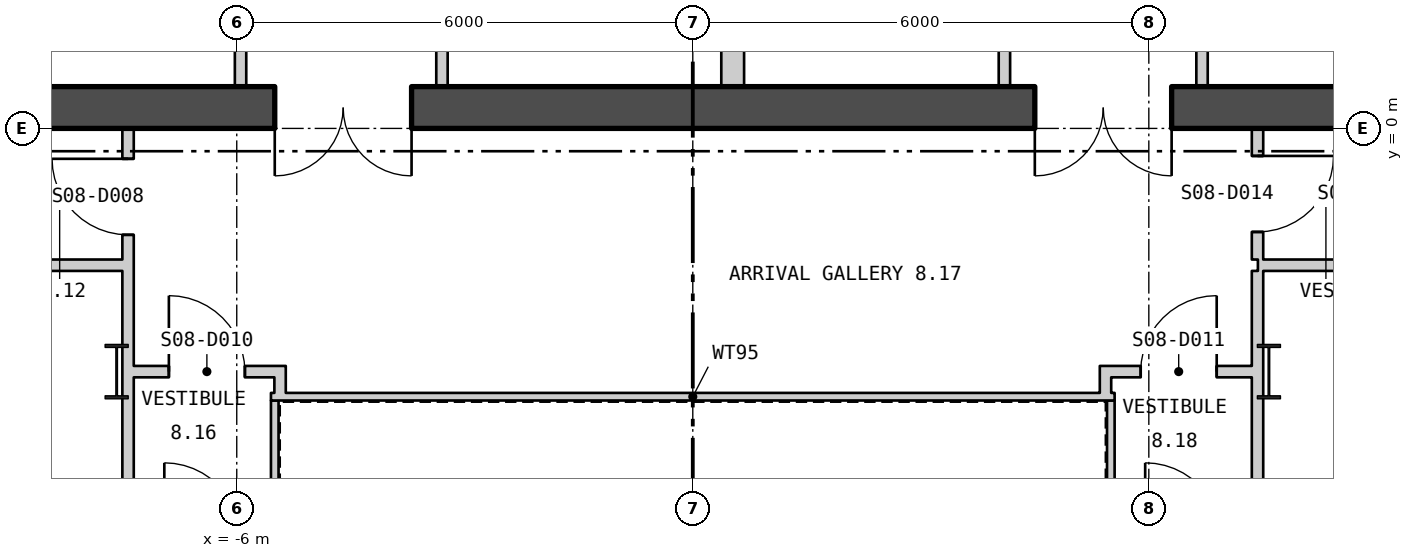
"""IFC4 building model, lengths in metres.
Left out: names, types, materials, properties, quantities, classifications, styles, units other than length and angle.
Written with IfcOpenShell. Run it as: python <this file> out.ifc"""

import sys

from ifc_helpers import new_model, si_unit, direction, frame, frame_2d, origin, origin_2d, place, context, subcontext, project, spatial, polyline, rectangle, i_section, outline, extrude, element, fill, save


model = new_model("IFC4")
c1 = context("Model", 3, precision=1e-05, world=origin(), true_north=direction((0.0, 1.0)))
c2 = subcontext(c1, "Body", "Model", "MODEL_VIEW")
j1 = project(units=[si_unit("LENGTHUNIT", "METRE"), si_unit("PLANEANGLEUNIT", "RADIAN")], contexts=[c1])
p1 = place(None, origin())
s1 = spatial("IfcSite", under=j1, at=p1, CompositionType="ELEMENT")
p2 = place(p1, origin())
s2 = spatial("IfcBuilding", under=s1, at=p2, CompositionType="ELEMENT")
p3 = place(p2, frame((0.0, 0.0, 111.3)))
s3 = spatial("IfcBuildingStorey", under=s2, at=p3, CompositionType="ELEMENT", Elevation=111.3)
for number, where, z_axis, x_axis in (
    (1, (7.58, -3.2, 0.0), (0.0, 0.0, 1.0), (1.0, 0.0, 0.0)),
    (2, (-7.58, -3.2, 0.0), (0.0, 0.0, 1.0), (1.0, 0.0, 0.0)),
):
    element("IfcColumn", number, at=place(p3, frame(where, z_axis=z_axis, x_axis=x_axis)), inside=s3, PredefinedType="COLUMN", context=c2, shape_type="SweptSolid", body=[
        extrude(i_section(OverallWidth=0.304, OverallDepth=0.716, WebThickness=0.021, FlangeThickness=0.04, at=origin_2d()), origin(), (0.0, 0.0, 1.0), 4.5),
    ])
p4 = place(p3, frame((-27.595, 11.782, -0.18), z_axis=(0.0, 0.0, 1.0), x_axis=(0.500000141277, -0.866025322218, 0.0)))
e3 = element("IfcWall", 3, at=p4, inside=s3, PredefinedType="SOLIDWALL", context=c2, shape_type="SweptSolid", body=[
    extrude(outline(polyline([(-0.13, -0.225), (45.86, -0.225), (45.6, 0.225), (0.13, 0.225), (-0.13, -0.225)])), origin(), (0.0, 0.0, 1.0), 4.28),
])
p5 = place(p4, frame((1.424, 0.0, 1.08)))
e4 = element("IfcOpeningElement", 4, at=p5, cuts=e3, PredefinedType="OPENING", context=c2, shape_type="SweptSolid", body=[
    extrude(rectangle(XDim=2.4, YDim=2.6, at=frame_2d((1.2, 1.3))), frame((0.0, 0.235, 0.0), z_axis=(0.0, -1.0, 0.0), x_axis=(1.0, 0.0, 0.0)), (0.0, 0.0, 1.0), 0.47),
])
p6 = place(p4, frame((5.892, 0.0, 1.08)))
e5 = element("IfcOpeningElement", 5, at=p6, cuts=e3, PredefinedType="OPENING", context=c2, shape_type="SweptSolid", body=[
    extrude(rectangle(XDim=2.4, YDim=2.6, at=frame_2d((1.2, 1.3))), frame((0.0, 0.235, 0.0), z_axis=(0.0, -1.0, 0.0), x_axis=(1.0, 0.0, 0.0)), (0.0, 0.0, 1.0), 0.47),
])
p7 = place(p4, frame((10.399, 0.0, 1.08)))
e6 = element("IfcOpeningElement", 6, at=p7, cuts=e3, PredefinedType="OPENING", context=c2, shape_type="SweptSolid", body=[
    extrude(rectangle(XDim=2.4, YDim=2.6, at=frame_2d((1.2, 1.3))), frame((0.0, 0.235, 0.0), z_axis=(0.0, -1.0, 0.0), x_axis=(1.0, 0.0, 0.0)), (0.0, 0.0, 1.0), 0.47),
])
p8 = place(p4, frame((14.905, 0.0, 1.08)))
e7 = element("IfcOpeningElement", 7, at=p8, cuts=e3, PredefinedType="OPENING", context=c2, shape_type="SweptSolid", body=[
    extrude(rectangle(XDim=2.4, YDim=2.6, at=frame_2d((1.2, 1.3))), frame((0.0, 0.235, 0.0), z_axis=(0.0, -1.0, 0.0), x_axis=(1.0, 0.0, 0.0)), (0.0, 0.0, 1.0), 0.47),
])
p9 = place(p4, frame((19.412, 0.0, 1.08)))
e8 = element("IfcOpeningElement", 8, at=p9, cuts=e3, PredefinedType="OPENING", context=c2, shape_type="SweptSolid", body=[
    extrude(rectangle(XDim=2.4, YDim=2.6, at=frame_2d((1.2, 1.3))), frame((0.0, 0.235, 0.0), z_axis=(0.0, -1.0, 0.0), x_axis=(1.0, 0.0, 0.0)), (0.0, 0.0, 1.0), 0.47),
])
p10 = place(p4, frame((23.918, 0.0, 1.08)))
e9 = element("IfcOpeningElement", 9, at=p10, cuts=e3, PredefinedType="OPENING", context=c2, shape_type="SweptSolid", body=[
    extrude(rectangle(XDim=2.4, YDim=2.6, at=frame_2d((1.2, 1.3))), frame((0.0, 0.235, 0.0), z_axis=(0.0, -1.0, 0.0), x_axis=(1.0, 0.0, 0.0)), (0.0, 0.0, 1.0), 0.47),
])
p11 = place(p4, frame((28.425, 0.0, 1.08)))
e10 = element("IfcOpeningElement", 10, at=p11, cuts=e3, PredefinedType="OPENING", context=c2, shape_type="SweptSolid", body=[
    extrude(rectangle(XDim=2.4, YDim=2.6, at=frame_2d((1.2, 1.3))), frame((0.0, 0.235, 0.0), z_axis=(0.0, -1.0, 0.0), x_axis=(1.0, 0.0, 0.0)), (0.0, 0.0, 1.0), 0.47),
])
p12 = place(p4, frame((32.932, 0.0, 1.08)))
e11 = element("IfcOpeningElement", 11, at=p12, cuts=e3, PredefinedType="OPENING", context=c2, shape_type="SweptSolid", body=[
    extrude(rectangle(XDim=2.4, YDim=2.6, at=frame_2d((1.2, 1.3))), frame((0.0, 0.235, 0.0), z_axis=(0.0, -1.0, 0.0), x_axis=(1.0, 0.0, 0.0)), (0.0, 0.0, 1.0), 0.47),
])
p13 = place(p4, frame((37.438, 0.0, 1.08)))
e12 = element("IfcOpeningElement", 12, at=p13, cuts=e3, PredefinedType="OPENING", context=c2, shape_type="SweptSolid", body=[
    extrude(rectangle(XDim=2.4, YDim=2.6, at=frame_2d((1.2, 1.3))), frame((0.0, 0.235, 0.0), z_axis=(0.0, -1.0, 0.0), x_axis=(1.0, 0.0, 0.0)), (0.0, 0.0, 1.0), 0.47),
])
p14 = place(p4, frame((41.907, 0.0, 1.08)))
e13 = element("IfcOpeningElement", 13, at=p14, cuts=e3, PredefinedType="OPENING", context=c2, shape_type="SweptSolid", body=[
    extrude(rectangle(XDim=2.4, YDim=2.6, at=frame_2d((1.2, 1.3))), frame((0.0, 0.235, 0.0), z_axis=(0.0, -1.0, 0.0), x_axis=(1.0, 0.0, 0.0)), (0.0, 0.0, 1.0), 0.47),
])
p15 = place(p3, frame((4.73, -27.821, -0.18), z_axis=(0.0, 0.0, 1.0), x_axis=(0.500000141277, 0.866025322218, 0.0)))
e14 = element("IfcWall", 14, at=p15, inside=s3, PredefinedType="SOLIDWALL", context=c2, shape_type="SweptSolid", body=[
    extrude(outline(polyline([(-0.13, -0.225), (45.86, -0.225), (45.6, 0.225), (0.13, 0.225), (-0.13, -0.225)])), origin(), (0.0, 0.0, 1.0), 4.28),
])
p16 = place(p15, frame((1.424, 0.0, 1.08)))
e15 = element("IfcOpeningElement", 15, at=p16, cuts=e14, PredefinedType="OPENING", context=c2, shape_type="SweptSolid", body=[
    extrude(rectangle(XDim=2.4, YDim=2.6, at=frame_2d((1.2, 1.3))), frame((0.0, 0.235, 0.0), z_axis=(0.0, -1.0, 0.0), x_axis=(1.0, 0.0, 0.0)), (0.0, 0.0, 1.0), 0.47),
])
p17 = place(p15, frame((5.892, 0.0, 1.08)))
e16 = element("IfcOpeningElement", 16, at=p17, cuts=e14, PredefinedType="OPENING", context=c2, shape_type="SweptSolid", body=[
    extrude(rectangle(XDim=2.4, YDim=2.6, at=frame_2d((1.2, 1.3))), frame((0.0, 0.235, 0.0), z_axis=(0.0, -1.0, 0.0), x_axis=(1.0, 0.0, 0.0)), (0.0, 0.0, 1.0), 0.47),
])
p18 = place(p15, frame((10.399, 0.0, 1.08)))
e17 = element("IfcOpeningElement", 17, at=p18, cuts=e14, PredefinedType="OPENING", context=c2, shape_type="SweptSolid", body=[
    extrude(rectangle(XDim=2.4, YDim=2.6, at=frame_2d((1.2, 1.3))), frame((0.0, 0.235, 0.0), z_axis=(0.0, -1.0, 0.0), x_axis=(1.0, 0.0, 0.0)), (0.0, 0.0, 1.0), 0.47),
])
p19 = place(p15, frame((14.905, 0.0, 1.08)))
e18 = element("IfcOpeningElement", 18, at=p19, cuts=e14, PredefinedType="OPENING", context=c2, shape_type="SweptSolid", body=[
    extrude(rectangle(XDim=2.4, YDim=2.6, at=frame_2d((1.2, 1.3))), frame((0.0, 0.235, 0.0), z_axis=(0.0, -1.0, 0.0), x_axis=(1.0, 0.0, 0.0)), (0.0, 0.0, 1.0), 0.47),
])
p20 = place(p15, frame((19.412, 0.0, 1.08)))
e19 = element("IfcOpeningElement", 19, at=p20, cuts=e14, PredefinedType="OPENING", context=c2, shape_type="SweptSolid", body=[
    extrude(rectangle(XDim=2.4, YDim=2.6, at=frame_2d((1.2, 1.3))), frame((0.0, 0.235, 0.0), z_axis=(0.0, -1.0, 0.0), x_axis=(1.0, 0.0, 0.0)), (0.0, 0.0, 1.0), 0.47),
])
p21 = place(p15, frame((23.918, 0.0, 1.08)))
e20 = element("IfcOpeningElement", 20, at=p21, cuts=e14, PredefinedType="OPENING", context=c2, shape_type="SweptSolid", body=[
    extrude(rectangle(XDim=2.4, YDim=2.6, at=frame_2d((1.2, 1.3))), frame((0.0, 0.235, 0.0), z_axis=(0.0, -1.0, 0.0), x_axis=(1.0, 0.0, 0.0)), (0.0, 0.0, 1.0), 0.47),
])
p22 = place(p15, frame((28.425, 0.0, 1.08)))
e21 = element("IfcOpeningElement", 21, at=p22, cuts=e14, PredefinedType="OPENING", context=c2, shape_type="SweptSolid", body=[
    extrude(rectangle(XDim=2.4, YDim=2.6, at=frame_2d((1.2, 1.3))), frame((0.0, 0.235, 0.0), z_axis=(0.0, -1.0, 0.0), x_axis=(1.0, 0.0, 0.0)), (0.0, 0.0, 1.0), 0.47),
])
p23 = place(p15, frame((32.932, 0.0, 1.08)))
e22 = element("IfcOpeningElement", 22, at=p23, cuts=e14, PredefinedType="OPENING", context=c2, shape_type="SweptSolid", body=[
    extrude(rectangle(XDim=2.4, YDim=2.6, at=frame_2d((1.2, 1.3))), frame((0.0, 0.235, 0.0), z_axis=(0.0, -1.0, 0.0), x_axis=(1.0, 0.0, 0.0)), (0.0, 0.0, 1.0), 0.47),
])
p24 = place(p15, frame((37.438, 0.0, 1.08)))
e23 = element("IfcOpeningElement", 23, at=p24, cuts=e14, PredefinedType="OPENING", context=c2, shape_type="SweptSolid", body=[
    extrude(rectangle(XDim=2.4, YDim=2.6, at=frame_2d((1.2, 1.3))), frame((0.0, 0.235, 0.0), z_axis=(0.0, -1.0, 0.0), x_axis=(1.0, 0.0, 0.0)), (0.0, 0.0, 1.0), 0.47),
])
p25 = place(p15, frame((41.907, 0.0, 1.08)))
e24 = element("IfcOpeningElement", 24, at=p25, cuts=e14, PredefinedType="OPENING", context=c2, shape_type="SweptSolid", body=[
    extrude(rectangle(XDim=2.4, YDim=2.6, at=frame_2d((1.2, 1.3))), frame((0.0, 0.235, 0.0), z_axis=(0.0, -1.0, 0.0), x_axis=(1.0, 0.0, 0.0)), (0.0, 0.0, 1.0), 0.47),
])
p26 = place(p3, frame((5.5, -11.62, 0.0), z_axis=(0.0, 0.0, 1.0), x_axis=(0.0, 1.0, 0.0)))
e25 = element("IfcWall", 25, at=p26, inside=s3, PredefinedType="PARTITIONING", context=c2, shape_type="SweptSolid", body=[
    extrude(rectangle(XDim=8.04, YDim=0.1, at=frame_2d((4.02, 0.0))), origin(), (0.0, 0.0, 1.0), 4.3),
])
p27 = place(p3, frame((5.55, -3.53, 0.0), z_axis=(0.0, 0.0, 1.0), x_axis=(-1.0, 0.0, 0.0)))
e26 = element("IfcWall", 26, at=p27, inside=s3, PredefinedType="PARTITIONING", context=c2, shape_type="SweptSolid", body=[
    extrude(rectangle(XDim=11.1, YDim=0.1, at=frame_2d((5.55, 0.0))), origin(), (0.0, 0.0, 1.0), 4.3),
])
p28 = place(p3, frame((-5.5, -3.58, 0.0), z_axis=(0.0, 0.0, 1.0), x_axis=(0.0, -1.0, 0.0)))
e27 = element("IfcWall", 27, at=p28, inside=s3, PredefinedType="PARTITIONING", context=c2, shape_type="SweptSolid", body=[
    extrude(rectangle(XDim=8.04, YDim=0.1, at=frame_2d((4.02, 0.0))), origin(), (0.0, 0.0, 1.0), 4.3),
])
p29 = place(p3, frame((-17.5, 0.275, 0.0), z_axis=(0.0, 0.0, 1.0), x_axis=(1.0, 0.0, 0.0)))
e28 = element("IfcWall", 28, at=p29, inside=s3, PredefinedType="SHEAR", context=c2, shape_type="SweptSolid", body=[
    extrude(rectangle(XDim=35.0, YDim=0.55, at=frame_2d((17.5, 0.0))), origin(), (0.0, 0.0, 1.0), 4.3),
])
p30 = place(p29, frame((12.0, 0.0, 0.0)))
e29 = element("IfcOpeningElement", 29, at=p30, cuts=e28, PredefinedType="OPENING", context=c2, shape_type="SweptSolid", body=[
    extrude(rectangle(XDim=1.8, YDim=2.4, at=frame_2d((0.9, 1.2))), frame((0.0, 0.285, 0.0), z_axis=(0.0, -1.0, 0.0), x_axis=(1.0, 0.0, 0.0)), (0.0, 0.0, 1.0), 0.57),
])
p31 = place(p29, frame((22.0, 0.0, 0.0)))
e30 = element("IfcOpeningElement", 30, at=p31, cuts=e28, PredefinedType="OPENING", context=c2, shape_type="SweptSolid", body=[
    extrude(rectangle(XDim=1.8, YDim=2.4, at=frame_2d((0.9, 1.2))), frame((0.0, 0.285, 0.0), z_axis=(0.0, -1.0, 0.0), x_axis=(1.0, 0.0, 0.0)), (0.0, 0.0, 1.0), 0.57),
])
p32 = place(p3, frame((-5.95, 0.55, 0.0), z_axis=(0.0, 0.0, 1.0), x_axis=(0.0, 1.0, 0.0)))
e31 = element("IfcWall", 31, at=p32, inside=s3, PredefinedType="PARTITIONING", context=c2, shape_type="SweptSolid", body=[
    extrude(rectangle(XDim=2.875, YDim=0.15, at=frame_2d((1.438, 0.0))), origin(), (0.0, 0.0, 1.0), 4.3),
])
for number, where, z_axis, x_axis in (
    (32, (-3.3, 0.55, 0.0), (0.0, 0.0, 1.0), (0.0, 1.0, 0.0)),
    (33, (0.45, 0.55, 0.0), (0.0, 0.0, 1.0), (0.0, 1.0, 0.0)),
):
    element("IfcWall", number, at=place(p3, frame(where, z_axis=z_axis, x_axis=x_axis)), inside=s3, PredefinedType="PARTITIONING", context=c2, shape_type="SweptSolid", body=[
        extrude(rectangle(XDim=3.275, YDim=0.15, at=frame_2d((1.637, 0.0))), origin(), (0.0, 0.0, 1.0), 4.3),
    ])
for number, where, z_axis, x_axis in (
    (34, (0.6, 0.55, 0.0), (0.0, 0.0, 1.0), (0.0, 1.0, 0.0)),
    (35, (4.1, 0.55, 0.0), (0.0, 0.0, 1.0), (0.0, 1.0, 0.0)),
):
    element("IfcWall", number, at=place(p3, frame(where, z_axis=z_axis, x_axis=x_axis)), inside=s3, PredefinedType="PARTITIONING", context=c2, shape_type="SweptSolid", body=[
        extrude(rectangle(XDim=3.075, YDim=0.15, at=frame_2d((1.538, 0.0))), origin(), (0.0, 0.0, 1.0), 4.3),
    ])
p33 = place(p3, frame((6.7, 0.55, 0.0), z_axis=(0.0, 0.0, 1.0), x_axis=(0.0, 1.0, 0.0)))
e36 = element("IfcWall", 36, at=p33, inside=s3, PredefinedType="PARTITIONING", context=c2, shape_type="SweptSolid", body=[
    extrude(rectangle(XDim=3.275, YDim=0.15, at=frame_2d((1.637, 0.0))), origin(), (0.0, 0.0, 1.0), 4.3),
])
p34 = place(p3, frame((-19.225, -1.8, 0.0), z_axis=(0.0, 0.0, 1.0), x_axis=(1.0, 0.0, 0.0)))
e37 = element("IfcWall", 37, at=p34, inside=s3, PredefinedType="PARTITIONING", context=c2, shape_type="SweptSolid", body=[
    extrude(rectangle(XDim=11.72, YDim=0.15, at=frame_2d((5.86, 0.0))), origin(), (0.0, 0.0, 1.0), 4.3),
])
p35 = place(p3, frame((-7.43, -13.675, 0.0), z_axis=(0.0, 0.0, 1.0), x_axis=(0.0, 1.0, 0.0)))
e38 = element("IfcWall", 38, at=p35, inside=s3, PredefinedType="PARTITIONING", context=c2, shape_type="SweptSolid", body=[
    extrude(rectangle(XDim=10.167, YDim=0.15, at=frame_2d((5.083, 0.0))), origin(), (0.0, 0.0, 1.0), 3.7),
])
p36 = place(p3, frame((-7.43, -3.508, 0.0), z_axis=(0.0, 0.0, 1.0), x_axis=(0.0, 1.0, 0.0)))
e39 = element("IfcWall", 39, at=p36, inside=s3, PredefinedType="PARTITIONING", context=c2, shape_type="SweptSolid", body=[
    extrude(rectangle(XDim=3.508, YDim=0.15, at=frame_2d((1.754, 0.0))), origin(), (0.0, 0.0, 1.0), 4.3),
])
p37 = place(p36, frame((2.108, 0.0, 0.0)))
e40 = element("IfcOpeningElement", 40, at=p37, cuts=e39, PredefinedType="OPENING", context=c2, shape_type="SweptSolid", body=[
    extrude(rectangle(XDim=1.0, YDim=2.1, at=frame_2d((0.5, 1.05))), frame((0.0, 0.085, 0.0), z_axis=(0.0, -1.0, 0.0), x_axis=(1.0, 0.0, 0.0)), (0.0, 0.0, 1.0), 0.17),
])
p38 = place(p3, frame((-7.355, -3.2, 0.0), z_axis=(0.0, 0.0, 1.0), x_axis=(1.0, 0.0, 0.0)))
e41 = element("IfcWall", 41, at=p38, inside=s3, PredefinedType="PARTITIONING", context=c2, shape_type="SweptSolid", body=[
    extrude(rectangle(XDim=2.0, YDim=0.15, at=frame_2d((1.0, 0.0))), origin(), (0.0, 0.0, 1.0), 3.39),
])
p39 = place(p38, frame((0.462, 0.0, 0.0)))
e42 = element("IfcOpeningElement", 42, at=p39, cuts=e41, PredefinedType="OPENING", context=c2, shape_type="SweptSolid", body=[
    extrude(rectangle(XDim=1.0, YDim=2.1, at=frame_2d((0.5, 1.05))), frame((0.0, 0.085, 0.0), z_axis=(0.0, -1.0, 0.0), x_axis=(1.0, 0.0, 0.0)), (0.0, 0.0, 1.0), 0.17),
])
p40 = place(p3, frame((-5.43, -3.48, 0.0), z_axis=(0.0, 0.0, 1.0), x_axis=(0.0, 1.0, 0.0)))
e43 = element("IfcWall", 43, at=p40, inside=s3, PredefinedType="PARTITIONING", context=c2, shape_type="SweptSolid", body=[
    extrude(rectangle(XDim=0.205, YDim=0.15, at=frame_2d((0.102, 0.0))), origin(), (0.0, 0.0, 1.0), 4.3),
])
p41 = place(p3, frame((5.355, -3.2, 0.0), z_axis=(0.0, 0.0, 1.0), x_axis=(1.0, 0.0, 0.0)))
e44 = element("IfcWall", 44, at=p41, inside=s3, PredefinedType="PARTITIONING", context=c2, shape_type="SweptSolid", body=[
    extrude(rectangle(XDim=2.0, YDim=0.15, at=frame_2d((1.0, 0.0))), origin(), (0.0, 0.0, 1.0), 3.39),
])
p42 = place(p41, frame((0.538, 0.0, 0.0)))
e45 = element("IfcOpeningElement", 45, at=p42, cuts=e44, PredefinedType="OPENING", context=c2, shape_type="SweptSolid", body=[
    extrude(rectangle(XDim=1.0, YDim=2.1, at=frame_2d((0.5, 1.05))), frame((0.0, 0.085, 0.0), z_axis=(0.0, -1.0, 0.0), x_axis=(1.0, 0.0, 0.0)), (0.0, 0.0, 1.0), 0.17),
])
p43 = place(p3, frame((5.43, -3.48, 0.0), z_axis=(0.0, 0.0, 1.0), x_axis=(0.0, 1.0, 0.0)))
e46 = element("IfcWall", 46, at=p43, inside=s3, PredefinedType="PARTITIONING", context=c2, shape_type="SweptSolid", body=[
    extrude(rectangle(XDim=0.205, YDim=0.15, at=frame_2d((0.102, 0.0))), origin(), (0.0, 0.0, 1.0), 4.3),
])
p44 = place(p3, frame((7.43, -13.675, 0.0), z_axis=(0.0, 0.0, 1.0), x_axis=(0.0, 1.0, 0.0)))
e47 = element("IfcWall", 47, at=p44, inside=s3, PredefinedType="PARTITIONING", context=c2, shape_type="SweptSolid", body=[
    extrude(rectangle(XDim=10.167, YDim=0.15, at=frame_2d((5.083, 0.0))), origin(), (0.0, 0.0, 1.0), 3.7),
])
p45 = place(p44, frame((2.183, 0.0, 0.0)))
e48 = element("IfcOpeningElement", 48, at=p45, cuts=e47, PredefinedType="OPENING", context=c2, shape_type="SweptSolid", body=[
    extrude(rectangle(XDim=1.0, YDim=2.1, at=frame_2d((0.5, 1.05))), frame((0.0, 0.085, 0.0), z_axis=(0.0, -1.0, 0.0), x_axis=(1.0, 0.0, 0.0)), (0.0, 0.0, 1.0), 0.17),
])
p46 = place(p3, frame((7.43, -3.508, 0.0), z_axis=(0.0, 0.0, 1.0), x_axis=(0.0, 1.0, 0.0)))
e49 = element("IfcWall", 49, at=p46, inside=s3, PredefinedType="PARTITIONING", context=c2, shape_type="SweptSolid", body=[
    extrude(rectangle(XDim=1.633, YDim=0.15, at=frame_2d((0.817, 0.0))), origin(), (0.0, 0.0, 1.0), 4.3),
])
p47 = place(p3, frame((7.43, -1.725, 0.0), z_axis=(0.0, 0.0, 1.0), x_axis=(0.0, 1.0, 0.0)))
e50 = element("IfcWall", 50, at=p47, inside=s3, PredefinedType="PARTITIONING", context=c2, shape_type="SweptSolid", body=[
    extrude(rectangle(XDim=1.725, YDim=0.15, at=frame_2d((0.863, 0.0))), origin(), (0.0, 0.0, 1.0), 4.3),
])
p48 = place(p47, frame((0.363, 0.0, 0.0)))
e51 = element("IfcOpeningElement", 51, at=p48, cuts=e50, PredefinedType="OPENING", context=c2, shape_type="SweptSolid", body=[
    extrude(rectangle(XDim=1.0, YDim=2.1, at=frame_2d((0.5, 1.05))), frame((0.0, 0.085, 0.0), z_axis=(0.0, -1.0, 0.0), x_axis=(1.0, 0.0, 0.0)), (0.0, 0.0, 1.0), 0.17),
])
p49 = place(p3, frame((7.435, -1.8, 0.0), z_axis=(0.0, 0.0, 1.0), x_axis=(1.0, 0.0, 0.0)))
e52 = element("IfcWall", 52, at=p49, inside=s3, PredefinedType="PARTITIONING", context=c2, shape_type="SweptSolid", body=[
    extrude(rectangle(XDim=11.79, YDim=0.15, at=frame_2d((5.895, 0.0))), origin(), (0.0, 0.0, 1.0), 4.3),
])
p50 = place(p30, origin())
e53 = element("IfcDoor", 53, at=p50, inside=s3, OperationType="DOUBLE_DOOR_SINGLE_SWING", PredefinedType="DOOR", context=c2, shape_type="SweptSolid", body=[
    extrude(rectangle(XDim=1.8, YDim=2.4, at=frame_2d((0.9, 1.2))), frame((0.0, 0.025, 0.0), z_axis=(0.0, -1.0, 0.0), x_axis=(1.0, 0.0, 0.0)), (0.0, 0.0, 1.0), 0.05),
])
fill(e29, e53)
p51 = place(p31, origin())
e54 = element("IfcDoor", 54, at=p51, inside=s3, OperationType="DOUBLE_DOOR_SINGLE_SWING", PredefinedType="DOOR", context=c2, shape_type="SweptSolid", body=[
    extrude(rectangle(XDim=1.8, YDim=2.4, at=frame_2d((0.9, 1.2))), frame((0.0, 0.025, 0.0), z_axis=(0.0, -1.0, 0.0), x_axis=(1.0, 0.0, 0.0)), (0.0, 0.0, 1.0), 0.05),
])
fill(e30, e54)
p52 = place(p37, origin())
e55 = element("IfcDoor", 55, at=p52, inside=s3, OperationType="SINGLE_SWING_LEFT", PredefinedType="DOOR", context=c2, shape_type="SweptSolid", body=[
    extrude(rectangle(XDim=1.0, YDim=2.1, at=frame_2d((0.5, 1.05))), frame((0.0, 0.025, 0.0), z_axis=(0.0, -1.0, 0.0), x_axis=(1.0, 0.0, 0.0)), (0.0, 0.0, 1.0), 0.05),
])
fill(e40, e55)
p53 = place(p39, origin())
e56 = element("IfcDoor", 56, at=p53, inside=s3, OperationType="SINGLE_SWING_RIGHT", PredefinedType="DOOR", context=c2, shape_type="SweptSolid", body=[
    extrude(rectangle(XDim=1.0, YDim=2.1, at=frame_2d((0.5, 1.05))), frame((0.0, 0.025, 0.0), z_axis=(0.0, -1.0, 0.0), x_axis=(1.0, 0.0, 0.0)), (0.0, 0.0, 1.0), 0.05),
])
fill(e42, e56)
p54 = place(p42, origin())
e57 = element("IfcDoor", 57, at=p54, inside=s3, OperationType="SINGLE_SWING_LEFT", PredefinedType="DOOR", context=c2, shape_type="SweptSolid", body=[
    extrude(rectangle(XDim=1.0, YDim=2.1, at=frame_2d((0.5, 1.05))), frame((0.0, 0.025, 0.0), z_axis=(0.0, -1.0, 0.0), x_axis=(1.0, 0.0, 0.0)), (0.0, 0.0, 1.0), 0.05),
])
fill(e45, e57)
p55 = place(p48, origin())
e58 = element("IfcDoor", 58, at=p55, inside=s3, OperationType="SINGLE_SWING_RIGHT", PredefinedType="DOOR", context=c2, shape_type="SweptSolid", body=[
    extrude(rectangle(XDim=1.0, YDim=2.1, at=frame_2d((0.5, 1.05))), frame((0.0, 0.025, 0.0), z_axis=(0.0, -1.0, 0.0), x_axis=(1.0, 0.0, 0.0)), (0.0, 0.0, 1.0), 0.05),
])
fill(e51, e58)
save(model, sys.argv[1])
